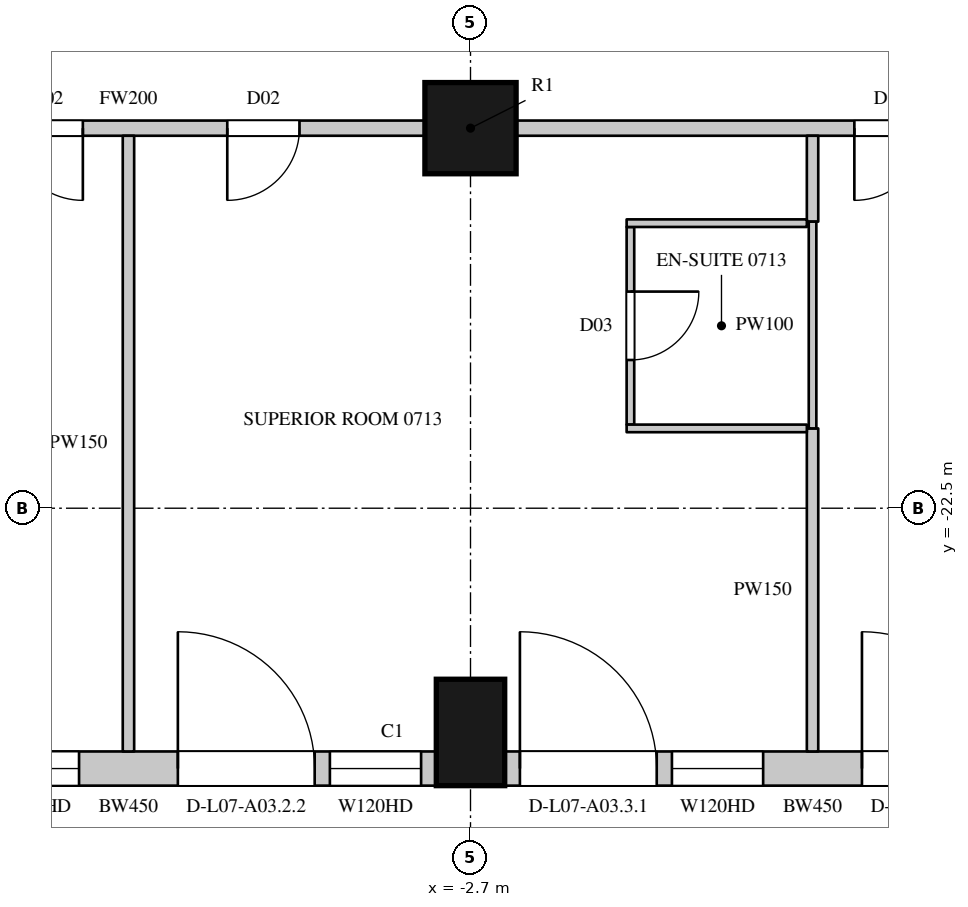
"""IFC4 building model, lengths in metres.
Left out: names, types, materials, properties, quantities, classifications, styles, units other than length and angle.
Written with IfcOpenShell. Run it as: python <this file> out.ifc"""

import sys

from ifc_helpers import new_model, si_unit, direction, frame, frame_2d, origin, origin_2d, place, context, subcontext, project, spatial, rectangle, circle, extrude, element, fill, save


model = new_model("IFC4")
c1 = context("Model", 3, precision=1e-05, world=origin(), true_north=direction((0.0, 1.0)))
c2 = subcontext(c1, "Body", "Model", "MODEL_VIEW")
j1 = project(units=[si_unit("LENGTHUNIT", "METRE"), si_unit("PLANEANGLEUNIT", "RADIAN")], contexts=[c1])
p1 = place(None, origin())
s1 = spatial("IfcSite", under=j1, at=p1, CompositionType="ELEMENT")
p2 = place(p1, origin())
s2 = spatial("IfcBuilding", under=s1, at=p2, CompositionType="ELEMENT")
p3 = place(p2, frame((0.0, 0.0, 55.5)))
s3 = spatial("IfcBuildingStorey", under=s2, at=p3, CompositionType="ELEMENT", Elevation=55.5)
p4 = place(p3, frame((-2.7, -25.45, 0.0), z_axis=(0.0, 0.0, 1.0), x_axis=(1.0, 0.0, 0.0)))
e1 = element("IfcColumn", 1, at=p4, inside=s3, PredefinedType="COLUMN", context=c2, shape_type="SweptSolid", body=[
    extrude(rectangle(XDim=0.9, YDim=1.4, at=origin_2d()), origin(), (0.0, 0.0, 1.0), 3.6),
])
p5 = place(p3, frame((-2.7, -17.5, 0.0), z_axis=(0.0, 0.0, 1.0), x_axis=(1.0, 0.0, 0.0)))
e2 = element("IfcColumn", 2, at=p5, inside=s3, PredefinedType="COLUMN", context=c2, shape_type="SweptSolid", body=[
    extrude(circle(Radius=0.6, at=origin_2d()), origin(), (0.0, 0.0, 1.0), 3.6),
])
p6 = place(p3, frame((-11.25, -25.925, 0.0), z_axis=(0.0, 0.0, 1.0), x_axis=(1.0, 0.0, 0.0)))
e3 = element("IfcWall", 3, at=p6, inside=s3, PredefinedType="SOLIDWALL", context=c2, shape_type="SweptSolid", body=[
    extrude(rectangle(XDim=8.1, YDim=0.45, at=frame_2d((4.05, 0.0))), origin(), (0.0, 0.0, 1.0), 3.3),
])
p7 = place(p6, frame((0.2, 0.0, 0.0)))
e4 = element("IfcOpeningElement", 4, at=p7, cuts=e3, PredefinedType="OPENING", context=c2, shape_type="SweptSolid", body=[
    extrude(rectangle(XDim=1.8, YDim=2.4, at=frame_2d((0.9, 1.2))), frame((0.0, 0.235, 0.0), z_axis=(0.0, -1.0, 0.0), x_axis=(1.0, 0.0, 0.0)), (0.0, 0.0, 1.0), 0.47),
])
p8 = place(p6, frame((2.2, 0.0, 1.05)))
e5 = element("IfcOpeningElement", 5, at=p8, cuts=e3, PredefinedType="OPENING", context=c2, shape_type="SweptSolid", body=[
    extrude(rectangle(XDim=1.2, YDim=2.0, at=frame_2d((0.6, 1.0))), frame((0.0, 0.235, 0.0), z_axis=(0.0, -1.0, 0.0), x_axis=(1.0, 0.0, 0.0)), (0.0, 0.0, 1.0), 0.47),
])
p9 = place(p6, frame((4.7, 0.0, 0.0)))
e6 = element("IfcOpeningElement", 6, at=p9, cuts=e3, PredefinedType="OPENING", context=c2, shape_type="SweptSolid", body=[
    extrude(rectangle(XDim=1.8, YDim=2.4, at=frame_2d((0.9, 1.2))), frame((0.0, 0.235, 0.0), z_axis=(0.0, -1.0, 0.0), x_axis=(1.0, 0.0, 0.0)), (0.0, 0.0, 1.0), 0.47),
])
p10 = place(p6, frame((6.7, 0.0, 1.05)))
e7 = element("IfcOpeningElement", 7, at=p10, cuts=e3, PredefinedType="OPENING", context=c2, shape_type="SweptSolid", body=[
    extrude(rectangle(XDim=1.2, YDim=2.0, at=frame_2d((0.6, 1.0))), frame((0.0, 0.235, 0.0), z_axis=(0.0, -1.0, 0.0), x_axis=(1.0, 0.0, 0.0)), (0.0, 0.0, 1.0), 0.47),
])
p11 = place(p3, frame((-2.25, -25.925, 0.0), z_axis=(0.0, 0.0, 1.0), x_axis=(1.0, 0.0, 0.0)))
e8 = element("IfcWall", 8, at=p11, inside=s3, PredefinedType="SOLIDWALL", context=c2, shape_type="SweptSolid", body=[
    extrude(rectangle(XDim=8.1, YDim=0.45, at=frame_2d((4.05, 0.0))), origin(), (0.0, 0.0, 1.0), 3.3),
])
p12 = place(p11, frame((0.2, 0.0, 0.0)))
e9 = element("IfcOpeningElement", 9, at=p12, cuts=e8, PredefinedType="OPENING", context=c2, shape_type="SweptSolid", body=[
    extrude(rectangle(XDim=1.8, YDim=2.4, at=frame_2d((0.9, 1.2))), frame((0.0, 0.235, 0.0), z_axis=(0.0, -1.0, 0.0), x_axis=(1.0, 0.0, 0.0)), (0.0, 0.0, 1.0), 0.47),
])
p13 = place(p11, frame((2.2, 0.0, 1.05)))
e10 = element("IfcOpeningElement", 10, at=p13, cuts=e8, PredefinedType="OPENING", context=c2, shape_type="SweptSolid", body=[
    extrude(rectangle(XDim=1.2, YDim=2.0, at=frame_2d((0.6, 1.0))), frame((0.0, 0.235, 0.0), z_axis=(0.0, -1.0, 0.0), x_axis=(1.0, 0.0, 0.0)), (0.0, 0.0, 1.0), 0.47),
])
p14 = place(p11, frame((4.7, 0.0, 0.0)))
e11 = element("IfcOpeningElement", 11, at=p14, cuts=e8, PredefinedType="OPENING", context=c2, shape_type="SweptSolid", body=[
    extrude(rectangle(XDim=1.8, YDim=2.4, at=frame_2d((0.9, 1.2))), frame((0.0, 0.235, 0.0), z_axis=(0.0, -1.0, 0.0), x_axis=(1.0, 0.0, 0.0)), (0.0, 0.0, 1.0), 0.47),
])
p15 = place(p11, frame((6.7, 0.0, 1.05)))
e12 = element("IfcOpeningElement", 12, at=p15, cuts=e8, PredefinedType="OPENING", context=c2, shape_type="SweptSolid", body=[
    extrude(rectangle(XDim=1.2, YDim=2.0, at=frame_2d((0.6, 1.0))), frame((0.0, 0.235, 0.0), z_axis=(0.0, -1.0, 0.0), x_axis=(1.0, 0.0, 0.0)), (0.0, 0.0, 1.0), 0.47),
])
p16 = place(p3, frame((-11.1, -17.5, 0.0), z_axis=(0.0, 0.0, 1.0), x_axis=(1.0, 0.0, 0.0)))
e13 = element("IfcWall", 13, at=p16, inside=s3, PredefinedType="PARTITIONING", context=c2, shape_type="SweptSolid", body=[
    extrude(rectangle(XDim=7.8, YDim=0.2, at=frame_2d((3.9, 0.0))), origin(), (0.0, 0.0, 1.0), 2.75),
])
p17 = place(p16, frame((2.35, 0.0, 0.0)))
e14 = element("IfcOpeningElement", 14, at=p17, cuts=e13, PredefinedType="OPENING", context=c2, shape_type="SweptSolid", body=[
    extrude(rectangle(XDim=0.95, YDim=2.2, at=frame_2d((0.475, 1.1))), frame((0.0, 0.11, 0.0), z_axis=(0.0, -1.0, 0.0), x_axis=(1.0, 0.0, 0.0)), (0.0, 0.0, 1.0), 0.22),
])
p18 = place(p16, frame((5.2, 0.0, 0.0)))
e15 = element("IfcOpeningElement", 15, at=p18, cuts=e13, PredefinedType="OPENING", context=c2, shape_type="SweptSolid", body=[
    extrude(rectangle(XDim=0.95, YDim=2.2, at=frame_2d((0.475, 1.1))), frame((0.0, 0.11, 0.0), z_axis=(0.0, -1.0, 0.0), x_axis=(1.0, 0.0, 0.0)), (0.0, 0.0, 1.0), 0.22),
])
p19 = place(p3, frame((-2.1, -17.5, 0.0), z_axis=(0.0, 0.0, 1.0), x_axis=(1.0, 0.0, 0.0)))
e16 = element("IfcWall", 16, at=p19, inside=s3, PredefinedType="PARTITIONING", context=c2, shape_type="SweptSolid", body=[
    extrude(rectangle(XDim=7.8, YDim=0.2, at=frame_2d((3.9, 0.0))), origin(), (0.0, 0.0, 1.0), 2.75),
])
p20 = place(p19, frame((4.45, 0.0, 0.0)))
e17 = element("IfcOpeningElement", 17, at=p20, cuts=e16, PredefinedType="OPENING", context=c2, shape_type="SweptSolid", body=[
    extrude(rectangle(XDim=0.95, YDim=2.2, at=frame_2d((0.475, 1.1))), frame((0.0, 0.11, 0.0), z_axis=(0.0, -1.0, 0.0), x_axis=(1.0, 0.0, 0.0)), (0.0, 0.0, 1.0), 0.22),
])
p21 = place(p3, frame((-7.2, -25.7, 0.0), z_axis=(0.0, 0.0, 1.0), x_axis=(0.0, 1.0, 0.0)))
e18 = element("IfcWall", 18, at=p21, inside=s3, PredefinedType="PARTITIONING", context=c2, shape_type="SweptSolid", body=[
    extrude(rectangle(XDim=8.1, YDim=0.15, at=frame_2d((4.05, 0.0))), origin(), (0.0, 0.0, 1.0), 2.65),
])
p22 = place(p3, frame((1.8, -25.7, 0.0), z_axis=(0.0, 0.0, 1.0), x_axis=(0.0, 1.0, 0.0)))
e19 = element("IfcWall", 19, at=p22, inside=s3, PredefinedType="PARTITIONING", context=c2, shape_type="SweptSolid", body=[
    extrude(rectangle(XDim=4.25, YDim=0.15, at=frame_2d((2.125, 0.0))), origin(), (0.0, 0.0, 1.0), 2.65),
])
p23 = place(p3, frame((1.8, -18.73, 0.0), z_axis=(0.0, 0.0, 1.0), x_axis=(0.0, 1.0, 0.0)))
e20 = element("IfcWall", 20, at=p23, inside=s3, PredefinedType="PARTITIONING", context=c2, shape_type="SweptSolid", body=[
    extrude(rectangle(XDim=1.13, YDim=0.15, at=frame_2d((0.565, 0.0))), origin(), (0.0, 0.0, 1.0), 2.65),
])
p24 = place(p3, frame((-0.596, -21.4, 0.0), z_axis=(0.0, 0.0, 1.0), x_axis=(0.0, 1.0, 0.0)))
e21 = element("IfcWall", 21, at=p24, inside=s3, PredefinedType="PARTITIONING", context=c2, shape_type="SweptSolid", body=[
    extrude(rectangle(XDim=2.6, YDim=0.1, at=frame_2d((1.3, 0.0))), origin(), (0.0, 0.0, 1.0), 3.3),
])
p25 = place(p24, frame((0.85, 0.0, 0.0)))
e22 = element("IfcOpeningElement", 22, at=p25, cuts=e21, PredefinedType="OPENING", context=c2, shape_type="SweptSolid", body=[
    extrude(rectangle(XDim=0.9, YDim=2.2, at=frame_2d((0.45, 1.1))), frame((0.0, 0.06, 0.0), z_axis=(0.0, -1.0, 0.0), x_axis=(1.0, 0.0, 0.0)), (0.0, 0.0, 1.0), 0.12),
])
for number, where, z_axis, x_axis in (
    (23, (-0.646, -21.45, 0.0), (0.0, 0.0, 1.0), (1.0, 0.0, 0.0)),
    (24, (-0.646, -18.75, 0.0), (0.0, 0.0, 1.0), (1.0, 0.0, 0.0)),
):
    element("IfcWall", number, at=place(p3, frame(where, z_axis=z_axis, x_axis=x_axis)), inside=s3, PredefinedType="PARTITIONING", context=c2, shape_type="SweptSolid", body=[
        extrude(rectangle(XDim=2.371, YDim=0.1, at=frame_2d((1.186, 0.0))), origin(), (0.0, 0.0, 1.0), 3.3),
    ])
p26 = place(p3, frame((1.8, -21.45, 0.0), z_axis=(0.0, 0.0, 1.0), x_axis=(0.0, 1.0, 0.0)))
e25 = element("IfcWall", 25, at=p26, inside=s3, PredefinedType="PARTITIONING", context=c2, shape_type="SweptSolid", body=[
    extrude(rectangle(XDim=2.72, YDim=0.1, at=frame_2d((1.36, 0.0))), origin(), (0.0, 0.0, 1.0), 2.65),
])
p27 = place(p8, origin())
e26 = element("IfcWindow", 26, at=p27, inside=s3, PartitioningType="SINGLE_PANEL", PredefinedType="WINDOW", context=c2, shape_type="SweptSolid", body=[
    extrude(rectangle(XDim=1.2, YDim=2.0, at=frame_2d((0.6, 1.0))), frame((0.0, 0.135, 0.0), z_axis=(0.0, -1.0, 0.0), x_axis=(1.0, 0.0, 0.0)), (0.0, 0.0, 1.0), 0.06),
])
fill(e5, e26)
p28 = place(p9, origin())
e27 = element("IfcDoor", 27, at=p28, inside=s3, OperationType="SLIDING_TO_LEFT", PredefinedType="DOOR", context=c2, shape_type="SweptSolid", body=[
    extrude(rectangle(XDim=1.8, YDim=2.4, at=frame_2d((0.9, 1.2))), frame((0.0, 0.13, 0.0), z_axis=(0.0, -1.0, 0.0), x_axis=(1.0, 0.0, 0.0)), (0.0, 0.0, 1.0), 0.05),
])
fill(e6, e27)
p29 = place(p10, origin())
e28 = element("IfcWindow", 28, at=p29, inside=s3, PartitioningType="SINGLE_PANEL", PredefinedType="WINDOW", context=c2, shape_type="SweptSolid", body=[
    extrude(rectangle(XDim=1.2, YDim=2.0, at=frame_2d((0.6, 1.0))), frame((0.0, 0.135, 0.0), z_axis=(0.0, -1.0, 0.0), x_axis=(1.0, 0.0, 0.0)), (0.0, 0.0, 1.0), 0.06),
])
fill(e7, e28)
p30 = place(p12, origin())
e29 = element("IfcDoor", 29, at=p30, inside=s3, OperationType="SLIDING_TO_LEFT", PredefinedType="DOOR", context=c2, shape_type="SweptSolid", body=[
    extrude(rectangle(XDim=1.8, YDim=2.4, at=frame_2d((0.9, 1.2))), frame((0.0, 0.13, 0.0), z_axis=(0.0, -1.0, 0.0), x_axis=(1.0, 0.0, 0.0)), (0.0, 0.0, 1.0), 0.05),
])
fill(e9, e29)
p31 = place(p13, origin())
e30 = element("IfcWindow", 30, at=p31, inside=s3, PartitioningType="SINGLE_PANEL", PredefinedType="WINDOW", context=c2, shape_type="SweptSolid", body=[
    extrude(rectangle(XDim=1.2, YDim=2.0, at=frame_2d((0.6, 1.0))), frame((0.0, 0.135, 0.0), z_axis=(0.0, -1.0, 0.0), x_axis=(1.0, 0.0, 0.0)), (0.0, 0.0, 1.0), 0.06),
])
fill(e10, e30)
p32 = place(p14, origin())
e31 = element("IfcDoor", 31, at=p32, inside=s3, OperationType="SLIDING_TO_LEFT", PredefinedType="DOOR", context=c2, shape_type="SweptSolid", body=[
    extrude(rectangle(XDim=1.8, YDim=2.4, at=frame_2d((0.9, 1.2))), frame((0.0, 0.13, 0.0), z_axis=(0.0, -1.0, 0.0), x_axis=(1.0, 0.0, 0.0)), (0.0, 0.0, 1.0), 0.05),
])
fill(e11, e31)
p33 = place(p17, origin())
e32 = element("IfcDoor", 32, at=p33, inside=s3, OperationType="SINGLE_SWING_LEFT", PredefinedType="DOOR", context=c2, shape_type="SweptSolid", body=[
    extrude(rectangle(XDim=0.95, YDim=2.2, at=frame_2d((0.475, 1.1))), frame((0.0, 0.025, 0.0), z_axis=(0.0, -1.0, 0.0), x_axis=(1.0, 0.0, 0.0)), (0.0, 0.0, 1.0), 0.05),
])
fill(e14, e32)
p34 = place(p18, origin())
e33 = element("IfcDoor", 33, at=p34, inside=s3, OperationType="SINGLE_SWING_RIGHT", PredefinedType="DOOR", context=c2, shape_type="SweptSolid", body=[
    extrude(rectangle(XDim=0.95, YDim=2.2, at=frame_2d((0.475, 1.1))), frame((0.0, 0.025, 0.0), z_axis=(0.0, -1.0, 0.0), x_axis=(1.0, 0.0, 0.0)), (0.0, 0.0, 1.0), 0.05),
])
fill(e15, e33)
p35 = place(p25, origin())
e34 = element("IfcDoor", 34, at=p35, inside=s3, OperationType="SINGLE_SWING_LEFT", PredefinedType="DOOR", context=c2, shape_type="SweptSolid", body=[
    extrude(rectangle(XDim=0.9, YDim=2.2, at=frame_2d((0.45, 1.1))), frame((0.0, 0.025, 0.0), z_axis=(0.0, -1.0, 0.0), x_axis=(1.0, 0.0, 0.0)), (0.0, 0.0, 1.0), 0.05),
])
fill(e22, e34)
p36 = place(p20, origin())
e35 = element("IfcDoor", 35, at=p36, inside=s3, OperationType="SINGLE_SWING_RIGHT", PredefinedType="DOOR", context=c2, shape_type="SweptSolid", body=[
    extrude(rectangle(XDim=0.95, YDim=2.2, at=frame_2d((0.475, 1.1))), frame((0.0, 0.025, 0.0), z_axis=(0.0, -1.0, 0.0), x_axis=(1.0, 0.0, 0.0)), (0.0, 0.0, 1.0), 0.05),
])
fill(e17, e35)
save(model, sys.argv[1])
